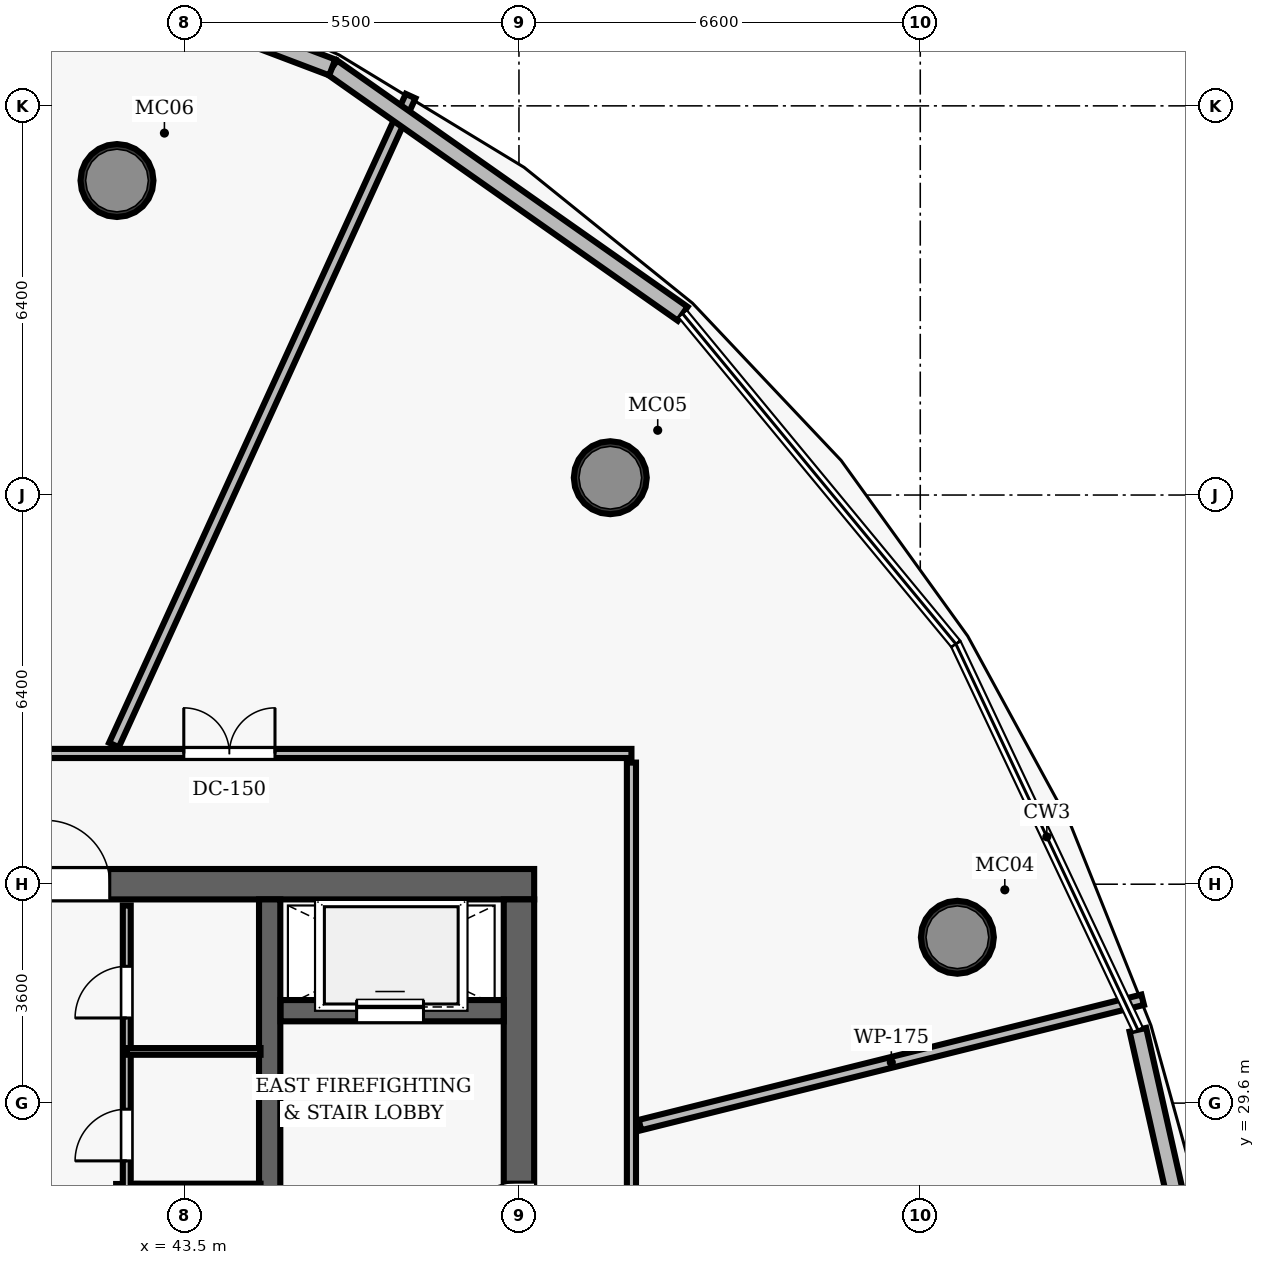
"""IFC4 building model, lengths in metres.
Left out: names, types, materials, properties, quantities, classifications, styles, units other than length and angle.
Written with IfcOpenShell. Run it as: python <this file> out.ifc"""

import sys

from ifc_helpers import new_model, si_unit, direction, frame, frame_2d, origin, origin_2d, place, context, subcontext, project, spatial, rectangle, hollow_circle, extrude, element, fill, save


model = new_model("IFC4")
c1 = context("Model", 3, precision=1e-05, world=origin(), true_north=direction((0.0, 1.0)))
c2 = subcontext(c1, "Body", "Model", "MODEL_VIEW")
j1 = project(units=[si_unit("LENGTHUNIT", "METRE"), si_unit("PLANEANGLEUNIT", "RADIAN")], contexts=[c1])
p1 = place(None, origin())
s1 = spatial("IfcSite", under=j1, at=p1, CompositionType="ELEMENT")
p2 = place(p1, origin())
s2 = spatial("IfcBuilding", under=s1, at=p2, CompositionType="ELEMENT")
p3 = place(p2, frame((0.0, 0.0, 202.0)))
s3 = spatial("IfcBuildingStorey", under=s2, at=p3, CompositionType="ELEMENT", Elevation=202.0)
p4 = place(p3, frame((26.75, 33.2, 0.0), z_axis=(0.0, 0.0, 1.0), x_axis=(1.0, 0.0, 0.0)))
e1 = element("IfcWall", 1, at=p4, inside=s3, PredefinedType="SHEAR", context=c2, shape_type="SweptSolid", body=[
    extrude(rectangle(XDim=22.5, YDim=0.5, at=frame_2d((11.25, 0.0))), origin(), (0.0, 0.0, 1.0), 3.85),
])
p5 = place(p4, frame((4.57, 0.0, 0.0)))
e2 = element("IfcOpeningElement", 2, at=p5, cuts=e1, PredefinedType="OPENING", context=c2, shape_type="SweptSolid", body=[
    extrude(rectangle(XDim=1.05, YDim=2.15, at=frame_2d((0.525, 1.075))), frame((0.0, 0.26, 0.0), z_axis=(0.0, -1.0, 0.0), x_axis=(1.0, 0.0, 0.0)), (0.0, 0.0, 1.0), 0.52),
])
p6 = place(p4, frame((14.47, 0.0, 0.0)))
e3 = element("IfcOpeningElement", 3, at=p6, cuts=e1, PredefinedType="OPENING", context=c2, shape_type="SweptSolid", body=[
    extrude(rectangle(XDim=1.05, YDim=2.15, at=frame_2d((0.525, 1.075))), frame((0.0, 0.26, 0.0), z_axis=(0.0, -1.0, 0.0), x_axis=(1.0, 0.0, 0.0)), (0.0, 0.0, 1.0), 0.52),
])
p7 = place(p3, frame((49.0, 19.05, 0.0), z_axis=(0.0, 0.0, 1.0), x_axis=(0.0, 1.0, 0.0)))
e4 = element("IfcWall", 4, at=p7, inside=s3, PredefinedType="SHEAR", context=c2, shape_type="SweptSolid", body=[
    extrude(rectangle(XDim=13.9, YDim=0.5, at=frame_2d((6.95, 0.0))), origin(), (0.0, 0.0, 1.0), 3.85),
])
p8 = place(p7, frame((8.2, 0.0, 0.0)))
e5 = element("IfcOpeningElement", 5, at=p8, cuts=e4, PredefinedType="OPENING", context=c2, shape_type="SweptSolid", body=[
    extrude(rectangle(XDim=1.05, YDim=2.15, at=frame_2d((0.525, 1.075))), frame((0.0, 0.26, 0.0), z_axis=(0.0, -1.0, 0.0), x_axis=(1.0, 0.0, 0.0)), (0.0, 0.0, 1.0), 0.52),
])
p9 = place(p3, frame((44.9, 19.05, 0.0), z_axis=(0.0, 0.0, 1.0), x_axis=(0.0, 1.0, 0.0)))
e6 = element("IfcWall", 6, at=p9, inside=s3, PredefinedType="SHEAR", context=c2, shape_type="SweptSolid", body=[
    extrude(rectangle(XDim=13.9, YDim=0.35, at=frame_2d((6.95, 0.0))), origin(), (0.0, 0.0, 1.0), 3.85),
])
for number, where, z_axis, x_axis in (
    (7, (56.21, 32.327, 0.0), (0.0, 0.0, 1.0), (1.0, 0.0, 0.0)),
    (8, (50.502, 39.885, 0.0), (0.0, 0.0, 1.0), (1.0, 0.0, 0.0)),
    (9, (42.389, 44.772, 0.0), (0.0, 0.0, 1.0), (1.0, 0.0, 0.0)),
):
    element("IfcColumn", number, at=place(p3, frame(where, z_axis=z_axis, x_axis=x_axis)), inside=s3, PredefinedType="COLUMN", context=c2, shape_type="SweptSolid", body=[
        extrude(hollow_circle(Radius=0.6, WallThickness=0.05, at=origin_2d()), origin(), (0.0, 0.0, 1.0), 3.85),
    ])
p10 = place(p3, frame((45.08, 31.12, 0.0), z_axis=(0.0, 0.0, 1.0), x_axis=(1.0, 0.0, 0.0)))
e10 = element("IfcWall", 10, at=p10, inside=s3, PredefinedType="SHEAR", context=c2, shape_type="SweptSolid", body=[
    extrude(rectangle(XDim=3.67, YDim=0.35, at=frame_2d((1.835, 0.0))), origin(), (0.0, 0.0, 1.0), 3.035),
])
p11 = place(p10, frame((1.25, 0.0, 0.0)))
e11 = element("IfcOpeningElement", 11, at=p11, cuts=e10, PredefinedType="OPENING", context=c2, shape_type="SweptSolid", body=[
    extrude(rectangle(XDim=1.1, YDim=2.15, at=frame_2d((0.55, 1.075))), frame((0.0, 0.185, 0.0), z_axis=(0.0, -1.0, 0.0), x_axis=(1.0, 0.0, 0.0)), (0.0, 0.0, 1.0), 0.37),
])
p12 = place(p3, frame((42.55, 21.73, 0.0), z_axis=(0.0, 0.0, 1.0), x_axis=(0.0, 1.0, 0.0)))
e12 = element("IfcWall", 12, at=p12, inside=s3, PredefinedType="SHEAR", context=c2, shape_type="SweptSolid", body=[
    extrude(rectangle(XDim=6.54, YDim=0.35, at=frame_2d((3.27, 0.0))), origin(), (0.0, 0.0, 1.0), 3.035),
])
p13 = place(p3, frame((42.72, 28.1, 0.0), z_axis=(0.0, 0.0, 1.0), x_axis=(1.0, 0.0, 0.0)))
e13 = element("IfcWall", 13, at=p13, inside=s3, PredefinedType="SHEAR", context=c2, shape_type="SweptSolid", body=[
    extrude(rectangle(XDim=2.03, YDim=0.35, at=frame_2d((1.015, 0.0))), origin(), (0.0, 0.0, 1.0), 3.035),
])
p14 = place(p3, frame((42.55, 28.1, 0.0), z_axis=(0.0, 0.0, 1.0), x_axis=(0.0, 1.0, 0.0)))
e14 = element("IfcWall", 14, at=p14, inside=s3, PredefinedType="PARTITIONING", context=c2, shape_type="SweptSolid", body=[
    extrude(rectangle(XDim=4.75, YDim=0.13, at=frame_2d((2.375, 0.0))), origin(), (0.0, 0.0, 1.0), 3.035),
])
p15 = place(p14, frame((0.55, 0.0, 0.0)))
e15 = element("IfcOpeningElement", 15, at=p15, cuts=e14, PredefinedType="OPENING", context=c2, shape_type="SweptSolid", body=[
    extrude(rectangle(XDim=0.85, YDim=2.1, at=frame_2d((0.425, 1.05))), frame((0.0, 0.075, 0.0), z_axis=(0.0, -1.0, 0.0), x_axis=(1.0, 0.0, 0.0)), (0.0, 0.0, 1.0), 0.15),
])
p16 = place(p14, frame((2.9, 0.0, 0.0)))
e16 = element("IfcOpeningElement", 16, at=p16, cuts=e14, PredefinedType="OPENING", context=c2, shape_type="SweptSolid", body=[
    extrude(rectangle(XDim=0.85, YDim=2.1, at=frame_2d((0.425, 1.05))), frame((0.0, 0.075, 0.0), z_axis=(0.0, -1.0, 0.0), x_axis=(1.0, 0.0, 0.0)), (0.0, 0.0, 1.0), 0.15),
])
p17 = place(p3, frame((42.55, 30.45, 0.0), z_axis=(0.0, 0.0, 1.0), x_axis=(1.0, 0.0, 0.0)))
e17 = element("IfcWall", 17, at=p17, inside=s3, PredefinedType="PARTITIONING", context=c2, shape_type="SweptSolid", body=[
    extrude(rectangle(XDim=2.2, YDim=0.11, at=frame_2d((1.1, 0.0))), origin(), (0.0, 0.0, 1.0), 3.035),
])
p18 = place(p3, frame((24.85, 35.35, 0.0), z_axis=(0.0, 0.0, 1.0), x_axis=(1.0, 0.0, 0.0)))
e18 = element("IfcWall", 18, at=p18, inside=s3, PredefinedType="PARTITIONING", context=c2, shape_type="SweptSolid", body=[
    extrude(rectangle(XDim=26.0, YDim=0.15, at=frame_2d((13.0, 0.0))), origin(), (0.0, 0.0, 1.0), 3.035),
])
p19 = place(p18, frame((18.638, 0.0, 0.0)))
e19 = element("IfcOpeningElement", 19, at=p19, cuts=e18, PredefinedType="OPENING", context=c2, shape_type="SweptSolid", body=[
    extrude(rectangle(XDim=1.5, YDim=2.2, at=frame_2d((0.75, 1.1))), frame((0.0, 0.085, 0.0), z_axis=(0.0, -1.0, 0.0), x_axis=(1.0, 0.0, 0.0)), (0.0, 0.0, 1.0), 0.17),
])
p20 = place(p18, frame((9.737, 0.0, 0.0)))
e20 = element("IfcOpeningElement", 20, at=p20, cuts=e18, PredefinedType="OPENING", context=c2, shape_type="SweptSolid", body=[
    extrude(rectangle(XDim=1.5, YDim=2.2, at=frame_2d((0.75, 1.1))), frame((0.0, 0.085, 0.0), z_axis=(0.0, -1.0, 0.0), x_axis=(1.0, 0.0, 0.0)), (0.0, 0.0, 1.0), 0.17),
])
p21 = place(p18, frame((5.148, 0.0, 0.0)))
e21 = element("IfcOpeningElement", 21, at=p21, cuts=e18, PredefinedType="OPENING", context=c2, shape_type="SweptSolid", body=[
    extrude(rectangle(XDim=0.95, YDim=2.15, at=frame_2d((0.475, 1.075))), frame((0.0, 0.085, 0.0), z_axis=(0.0, -1.0, 0.0), x_axis=(1.0, 0.0, 0.0)), (0.0, 0.0, 1.0), 0.17),
])
p22 = place(p3, frame((50.85, 27.08, 0.0), z_axis=(0.0, 0.0, 1.0), x_axis=(0.0, 1.0, 0.0)))
e22 = element("IfcWall", 22, at=p22, inside=s3, PredefinedType="PARTITIONING", context=c2, shape_type="SweptSolid", body=[
    extrude(rectangle(XDim=8.12, YDim=0.15, at=frame_2d((4.06, 0.0))), origin(), (0.0, 0.0, 1.0), 3.035),
])
p23 = place(p3, frame((50.99, 29.239, 0.0), z_axis=(0.0, 0.0, 1.0), x_axis=(0.970292315067, 0.241935576803, 0.0)))
e23 = element("IfcWall", 23, at=p23, inside=s3, PredefinedType="PARTITIONING", context=c2, shape_type="SweptSolid", body=[
    extrude(rectangle(XDim=8.521, YDim=0.175, at=frame_2d((4.26, 0.0))), origin(), (0.0, 0.0, 1.0), 3.035),
])
p24 = place(p3, frame((42.339, 35.49, 0.0), z_axis=(0.0, 0.0, 1.0), x_axis=(0.415830571433, 0.909442101434, 0.0)))
e24 = element("IfcWall", 24, at=p24, inside=s3, PredefinedType="PARTITIONING", context=c2, shape_type="SweptSolid", body=[
    extrude(rectangle(XDim=11.733, YDim=0.175, at=frame_2d((5.866, 0.0))), origin(), (0.0, 0.0, 1.0), 3.035),
])
p25 = place(p3, frame((59.179, 30.806, 0.0), z_axis=(0.0, 0.0, 1.0), x_axis=(0.219794754914, -0.975546137152, 0.0)))
e25 = element("IfcWall", 25, at=p25, inside=s3, PredefinedType="SOLIDWALL", context=c2, shape_type="SweptSolid", body=[
    extrude(rectangle(XDim=6.785, YDim=0.28, at=frame_2d((3.392, 0.0))), origin(), (0.0, 0.0, 1.0), 3.62),
])
p26 = place(p3, frame((45.929, 46.632, 0.0), z_axis=(0.0, 0.0, 1.0), x_axis=(0.818111945774, -0.575058991915, 0.0)))
e26 = element("IfcWall", 26, at=p26, inside=s3, PredefinedType="SOLIDWALL", context=c2, shape_type="SweptSolid", body=[
    extrude(rectangle(XDim=7.045, YDim=0.28, at=frame_2d((3.523, 0.0))), origin(), (0.0, 0.0, 1.0), 3.62),
])
p27 = place(p3, frame((39.367, 49.12, 0.0), z_axis=(0.0, 0.0, 1.0), x_axis=(0.935067918336, -0.354468599595, 0.0)))
e27 = element("IfcWall", 27, at=p27, inside=s3, PredefinedType="SOLIDWALL", context=c2, shape_type="SweptSolid", body=[
    extrude(rectangle(XDim=7.018, YDim=0.28, at=frame_2d((3.509, 0.0))), origin(), (0.0, 0.0, 1.0), 3.62),
])
p28 = place(p8, origin())
e28 = element("IfcDoor", 28, at=p28, inside=s3, OperationType="SINGLE_SWING_LEFT", PredefinedType="DOOR", context=c2, shape_type="SweptSolid", body=[
    extrude(rectangle(XDim=1.05, YDim=2.15, at=frame_2d((0.525, 1.075))), frame((0.0, 0.025, 0.0), z_axis=(0.0, -1.0, 0.0), x_axis=(1.0, 0.0, 0.0)), (0.0, 0.0, 1.0), 0.05),
])
fill(e5, e28)
p29 = place(p6, origin())
e29 = element("IfcDoor", 29, at=p29, inside=s3, OperationType="SINGLE_SWING_LEFT", PredefinedType="DOOR", context=c2, shape_type="SweptSolid", body=[
    extrude(rectangle(XDim=1.05, YDim=2.15, at=frame_2d((0.525, 1.075))), frame((0.0, 0.025, 0.0), z_axis=(0.0, -1.0, 0.0), x_axis=(1.0, 0.0, 0.0)), (0.0, 0.0, 1.0), 0.05),
])
fill(e3, e29)
p30 = place(p15, origin())
e30 = element("IfcDoor", 30, at=p30, inside=s3, OperationType="SINGLE_SWING_LEFT", PredefinedType="DOOR", context=c2, shape_type="SweptSolid", body=[
    extrude(rectangle(XDim=0.85, YDim=2.1, at=frame_2d((0.425, 1.05))), frame((0.0, 0.025, 0.0), z_axis=(0.0, -1.0, 0.0), x_axis=(1.0, 0.0, 0.0)), (0.0, 0.0, 1.0), 0.05),
])
fill(e15, e30)
p31 = place(p16, origin())
e31 = element("IfcDoor", 31, at=p31, inside=s3, OperationType="SINGLE_SWING_LEFT", PredefinedType="DOOR", context=c2, shape_type="SweptSolid", body=[
    extrude(rectangle(XDim=0.85, YDim=2.1, at=frame_2d((0.425, 1.05))), frame((0.0, 0.025, 0.0), z_axis=(0.0, -1.0, 0.0), x_axis=(1.0, 0.0, 0.0)), (0.0, 0.0, 1.0), 0.05),
])
fill(e16, e31)
p32 = place(p19, origin())
e32 = element("IfcDoor", 32, at=p32, inside=s3, OperationType="DOUBLE_DOOR_SINGLE_SWING", PredefinedType="DOOR", context=c2, shape_type="SweptSolid", body=[
    extrude(rectangle(XDim=1.5, YDim=2.2, at=frame_2d((0.75, 1.1))), frame((0.0, 0.025, 0.0), z_axis=(0.0, -1.0, 0.0), x_axis=(1.0, 0.0, 0.0)), (0.0, 0.0, 1.0), 0.05),
])
fill(e19, e32)
p33 = place(p11, origin())
e33 = element("IfcDoor", 33, at=p33, inside=s3, OperationType="SLIDING_TO_LEFT", PredefinedType="DOOR", context=c2, shape_type="SweptSolid", body=[
    extrude(rectangle(XDim=1.1, YDim=2.15, at=frame_2d((0.55, 1.075))), frame((0.0, 0.025, 0.0), z_axis=(0.0, -1.0, 0.0), x_axis=(1.0, 0.0, 0.0)), (0.0, 0.0, 1.0), 0.05),
])
fill(e11, e33)
save(model, sys.argv[1])
